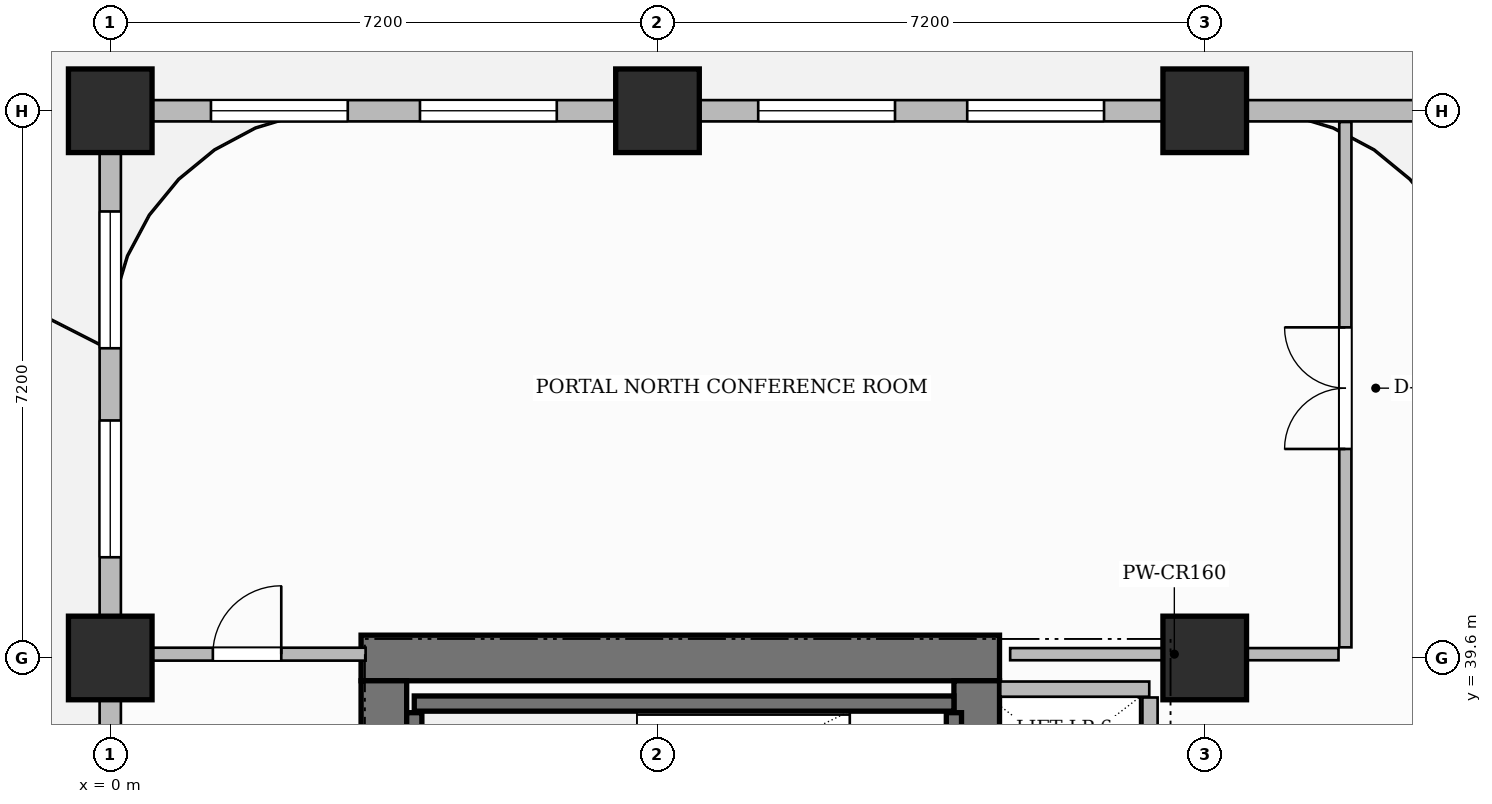
"""IFC4 building model, lengths in metres.
Left out: names, types, materials, properties, quantities, classifications, styles, units other than length and angle.
Written with IfcOpenShell. Run it as: python <this file> out.ifc"""

import sys

from ifc_helpers import new_model, si_unit, direction, frame, frame_2d, origin, origin_2d, place, context, subcontext, project, spatial, rectangle, extrude, source, transform, mapped, element, fill, save


model = new_model("IFC4")
c1 = context("Model", 3, precision=1e-05, world=origin(), true_north=direction((0.0, 1.0)))
c2 = subcontext(c1, "Body", "Model", "MODEL_VIEW")
j1 = project(units=[si_unit("LENGTHUNIT", "METRE"), si_unit("PLANEANGLEUNIT", "RADIAN")], contexts=[c1])
p1 = place(None, origin())
s1 = spatial("IfcSite", under=j1, at=p1, CompositionType="ELEMENT")
p2 = place(p1, origin())
s2 = spatial("IfcBuilding", under=s1, at=p2, CompositionType="ELEMENT")
p3 = place(p2, frame((0.0, 0.0, 58.3)))
s3 = spatial("IfcBuildingStorey", under=s2, at=p3, CompositionType="ELEMENT", Elevation=58.3)
p4 = place(p3, frame((3.3, 39.6, 0.0), z_axis=(0.0, 0.0, 1.0), x_axis=(1.0, 0.0, 0.0)))
e1 = element("IfcWall", 1, at=p4, inside=s3, PredefinedType="SHEAR", context=c2, shape_type="SweptSolid", body=[
    extrude(rectangle(XDim=8.4, YDim=0.6, at=frame_2d((4.2, 0.0))), origin(), (0.0, 0.0, 1.0), 3.7),
])
p5 = place(p3, frame((3.6, 25.5, 0.0), z_axis=(0.0, 0.0, 1.0), x_axis=(0.0, 1.0, 0.0)))
e2 = element("IfcWall", 2, at=p5, inside=s3, PredefinedType="SHEAR", context=c2, shape_type="SweptSolid", body=[
    extrude(rectangle(XDim=13.8, YDim=0.6, at=frame_2d((6.9, 0.0))), origin(), (0.0, 0.0, 1.0), 3.7),
])
p6 = place(p3, frame((11.4, 25.5, 0.0), z_axis=(0.0, 0.0, 1.0), x_axis=(0.0, 1.0, 0.0)))
e3 = element("IfcWall", 3, at=p6, inside=s3, PredefinedType="SHEAR", context=c2, shape_type="SweptSolid", body=[
    extrude(rectangle(XDim=13.8, YDim=0.6, at=frame_2d((6.9, 0.0))), origin(), (0.0, 0.0, 1.0), 3.7),
])
p7 = place(p6, frame((6.47, 0.0, 0.0)))
e4 = element("IfcOpeningElement", 4, at=p7, cuts=e3, PredefinedType="OPENING", context=c2, shape_type="SweptSolid", body=[
    extrude(rectangle(XDim=1.5, YDim=2.2, at=frame_2d((0.75, 1.1))), frame((0.0, 0.31, 0.0), z_axis=(0.0, -1.0, 0.0), x_axis=(1.0, 0.0, 0.0)), (0.0, 0.0, 1.0), 0.62),
])
m1 = source(origin(), c2, "Body", "SweptSolid", [
    extrude(rectangle(XDim=1.1, YDim=1.1, at=origin_2d()), origin(), (0.0, 0.0, 1.0), 3.7),
])
for number, where, z_axis, x_axis in (
    (5, (0.0, 39.6, 0.0), (0.0, 0.0, 1.0), (1.0, 0.0, 0.0)),
    (6, (0.0, 46.8, 0.0), (0.0, 0.0, 1.0), (1.0, 0.0, 0.0)),
    (7, (7.2, 46.8, 0.0), (0.0, 0.0, 1.0), (1.0, 0.0, 0.0)),
    (8, (14.4, 39.6, 0.0), (0.0, 0.0, 1.0), (1.0, 0.0, 0.0)),
    (9, (14.4, 46.8, 0.0), (0.0, 0.0, 1.0), (1.0, 0.0, 0.0)),
):
    element("IfcColumn", number, at=place(p3, frame(where, z_axis=z_axis, x_axis=x_axis)), inside=s3, PredefinedType="COLUMN", context=c2, shape_type="MappedRepresentation", body=[
        mapped(m1, transform((0.0, 0.0, 0.0), scale=1.0)),
    ])
p8 = place(p3, frame((4.0, 39.0, 0.0), z_axis=(0.0, 0.0, 1.0), x_axis=(1.0, 0.0, 0.0)))
e10 = element("IfcWall", 10, at=p8, inside=s3, PredefinedType="SHEAR", context=c2, shape_type="SweptSolid", body=[
    extrude(rectangle(XDim=7.1, YDim=0.2, at=frame_2d((3.55, 0.0))), origin(), (0.0, 0.0, 1.0), 3.7),
])
for number, where, z_axis, x_axis in (
    (11, (4.0, 36.18, 0.0), (0.0, 0.0, 1.0), (0.0, 1.0, 0.0)),
    (12, (11.1, 36.18, 0.0), (0.0, 0.0, 1.0), (0.0, 1.0, 0.0)),
):
    element("IfcWall", number, at=place(p3, frame(where, z_axis=z_axis, x_axis=x_axis)), inside=s3, PredefinedType="SHEAR", context=c2, shape_type="SweptSolid", body=[
        extrude(rectangle(XDim=2.7, YDim=0.2, at=frame_2d((1.35, 0.0))), origin(), (0.0, 0.0, 1.0), 3.7),
    ])
p9 = place(p3, frame((11.71, 39.19, 0.0), z_axis=(0.0, 0.0, 1.0), x_axis=(1.0, 0.0, 0.0)))
e13 = element("IfcWall", 13, at=p9, inside=s3, PredefinedType="PARTITIONING", context=c2, shape_type="SweptSolid", body=[
    extrude(rectangle(XDim=1.96, YDim=0.2, at=frame_2d((0.98, 0.0))), origin(), (0.0, 0.0, 1.0), 3.45),
])
p10 = place(p3, frame((13.68, 34.36, 0.0), z_axis=(0.0, 0.0, 1.0), x_axis=(0.0, 1.0, 0.0)))
e14 = element("IfcWall", 14, at=p10, inside=s3, PredefinedType="PARTITIONING", context=c2, shape_type="SweptSolid", body=[
    extrude(rectangle(XDim=4.72, YDim=0.2, at=frame_2d((2.36, 0.0))), origin(), (0.0, 0.0, 1.0), 3.45),
])
p11 = place(p3, frame((16.25, 39.74, 0.0), z_axis=(0.0, 0.0, 1.0), x_axis=(0.0, 1.0, 0.0)))
e15 = element("IfcWall", 15, at=p11, inside=s3, PredefinedType="PARTITIONING", context=c2, shape_type="SweptSolid", body=[
    extrude(rectangle(XDim=6.912, YDim=0.16, at=frame_2d((3.456, 0.0))), origin(), (0.0, 0.0, 1.0), 3.45),
])
p12 = place(p11, frame((2.61, 0.0, 0.0)))
e16 = element("IfcOpeningElement", 16, at=p12, cuts=e15, PredefinedType="OPENING", context=c2, shape_type="SweptSolid", body=[
    extrude(rectangle(XDim=1.6, YDim=2.4, at=frame_2d((0.8, 1.2))), frame((0.0, 0.09, 0.0), z_axis=(0.0, -1.0, 0.0), x_axis=(1.0, 0.0, 0.0)), (0.0, 0.0, 1.0), 0.18),
])
p13 = place(p3, frame((11.84, 39.65, 0.0), z_axis=(0.0, 0.0, 1.0), x_axis=(1.0, 0.0, 0.0)))
e17 = element("IfcWall", 17, at=p13, inside=s3, PredefinedType="PARTITIONING", context=c2, shape_type="SweptSolid", body=[
    extrude(rectangle(XDim=4.32, YDim=0.16, at=frame_2d((2.16, 0.0))), origin(), (0.0, 0.0, 1.0), 2.885),
])
p14 = place(p3, frame((0.24, 39.65, 0.0), z_axis=(0.0, 0.0, 1.0), x_axis=(1.0, 0.0, 0.0)))
e18 = element("IfcWall", 18, at=p14, inside=s3, PredefinedType="PARTITIONING", context=c2, shape_type="SweptSolid", body=[
    extrude(rectangle(XDim=3.12, YDim=0.17, at=frame_2d((1.56, 0.0))), origin(), (0.0, 0.0, 1.0), 3.45),
])
p15 = place(p14, frame((1.11, 0.0, 0.0)))
e19 = element("IfcOpeningElement", 19, at=p15, cuts=e18, PredefinedType="OPENING", context=c2, shape_type="SweptSolid", body=[
    extrude(rectangle(XDim=0.9, YDim=2.15, at=frame_2d((0.45, 1.075))), frame((0.0, 0.095, 0.0), z_axis=(0.0, -1.0, 0.0), x_axis=(1.0, 0.0, 0.0)), (0.0, 0.0, 1.0), 0.19),
])
p16 = place(p3, frame((0.0, 46.8, 0.0), z_axis=(0.0, 0.0, 1.0), x_axis=(1.0, 0.0, 0.0)))
e20 = element("IfcWall", 20, at=p16, inside=s3, PredefinedType="SOLIDWALL", context=c2, shape_type="SweptSolid", body=[
    extrude(rectangle(XDim=18.0, YDim=0.28, at=frame_2d((9.0, 0.0))), origin(), (0.0, 0.0, 1.0), 2.885),
])
p17 = place(p16, frame((1.325, 0.0, 0.8)))
e21 = element("IfcOpeningElement", 21, at=p17, cuts=e20, PredefinedType="OPENING", context=c2, shape_type="SweptSolid", body=[
    extrude(rectangle(XDim=1.8, YDim=1.85, at=frame_2d((0.9, 0.925))), frame((0.0, 0.15, 0.0), z_axis=(0.0, -1.0, 0.0), x_axis=(1.0, 0.0, 0.0)), (0.0, 0.0, 1.0), 0.3),
])
p18 = place(p16, frame((4.075, 0.0, 0.8)))
e22 = element("IfcOpeningElement", 22, at=p18, cuts=e20, PredefinedType="OPENING", context=c2, shape_type="SweptSolid", body=[
    extrude(rectangle(XDim=1.8, YDim=1.85, at=frame_2d((0.9, 0.925))), frame((0.0, 0.15, 0.0), z_axis=(0.0, -1.0, 0.0), x_axis=(1.0, 0.0, 0.0)), (0.0, 0.0, 1.0), 0.3),
])
p19 = place(p16, frame((8.525, 0.0, 0.8)))
e23 = element("IfcOpeningElement", 23, at=p19, cuts=e20, PredefinedType="OPENING", context=c2, shape_type="SweptSolid", body=[
    extrude(rectangle(XDim=1.8, YDim=1.85, at=frame_2d((0.9, 0.925))), frame((0.0, 0.15, 0.0), z_axis=(0.0, -1.0, 0.0), x_axis=(1.0, 0.0, 0.0)), (0.0, 0.0, 1.0), 0.3),
])
p20 = place(p16, frame((11.275, 0.0, 0.8)))
e24 = element("IfcOpeningElement", 24, at=p20, cuts=e20, PredefinedType="OPENING", context=c2, shape_type="SweptSolid", body=[
    extrude(rectangle(XDim=1.8, YDim=1.85, at=frame_2d((0.9, 0.925))), frame((0.0, 0.15, 0.0), z_axis=(0.0, -1.0, 0.0), x_axis=(1.0, 0.0, 0.0)), (0.0, 0.0, 1.0), 0.3),
])
p21 = place(p3, frame((0.0, 25.25, 0.0), z_axis=(0.0, 0.0, 1.0), x_axis=(0.0, 1.0, 0.0)))
e25 = element("IfcWall", 25, at=p21, inside=s3, PredefinedType="SOLIDWALL", context=c2, shape_type="SweptSolid", body=[
    extrude(rectangle(XDim=21.5, YDim=0.28, at=frame_2d((10.75, 0.0))), origin(), (0.0, 0.0, 1.0), 2.885),
])
p22 = place(p21, frame((1.275, 0.0, 0.8)))
e26 = element("IfcOpeningElement", 26, at=p22, cuts=e25, PredefinedType="OPENING", context=c2, shape_type="SweptSolid", body=[
    extrude(rectangle(XDim=1.8, YDim=1.85, at=frame_2d((0.9, 0.925))), frame((0.0, 0.15, 0.0), z_axis=(0.0, -1.0, 0.0), x_axis=(1.0, 0.0, 0.0)), (0.0, 0.0, 1.0), 0.3),
])
p23 = place(p21, frame((4.025, 0.0, 0.8)))
e27 = element("IfcOpeningElement", 27, at=p23, cuts=e25, PredefinedType="OPENING", context=c2, shape_type="SweptSolid", body=[
    extrude(rectangle(XDim=1.8, YDim=1.85, at=frame_2d((0.9, 0.925))), frame((0.0, 0.15, 0.0), z_axis=(0.0, -1.0, 0.0), x_axis=(1.0, 0.0, 0.0)), (0.0, 0.0, 1.0), 0.3),
])
p24 = place(p21, frame((8.475, 0.0, 0.8)))
e28 = element("IfcOpeningElement", 28, at=p24, cuts=e25, PredefinedType="OPENING", context=c2, shape_type="SweptSolid", body=[
    extrude(rectangle(XDim=1.8, YDim=1.85, at=frame_2d((0.9, 0.925))), frame((0.0, 0.15, 0.0), z_axis=(0.0, -1.0, 0.0), x_axis=(1.0, 0.0, 0.0)), (0.0, 0.0, 1.0), 0.3),
])
p25 = place(p21, frame((11.225, 0.0, 0.8)))
e29 = element("IfcOpeningElement", 29, at=p25, cuts=e25, PredefinedType="OPENING", context=c2, shape_type="SweptSolid", body=[
    extrude(rectangle(XDim=1.8, YDim=1.85, at=frame_2d((0.9, 0.925))), frame((0.0, 0.15, 0.0), z_axis=(0.0, -1.0, 0.0), x_axis=(1.0, 0.0, 0.0)), (0.0, 0.0, 1.0), 0.3),
])
p26 = place(p21, frame((15.675, 0.0, 0.8)))
e30 = element("IfcOpeningElement", 30, at=p26, cuts=e25, PredefinedType="OPENING", context=c2, shape_type="SweptSolid", body=[
    extrude(rectangle(XDim=1.8, YDim=1.85, at=frame_2d((0.9, 0.925))), frame((0.0, 0.15, 0.0), z_axis=(0.0, -1.0, 0.0), x_axis=(1.0, 0.0, 0.0)), (0.0, 0.0, 1.0), 0.3),
])
p27 = place(p21, frame((18.425, 0.0, 0.8)))
e31 = element("IfcOpeningElement", 31, at=p27, cuts=e25, PredefinedType="OPENING", context=c2, shape_type="SweptSolid", body=[
    extrude(rectangle(XDim=1.8, YDim=1.85, at=frame_2d((0.9, 0.925))), frame((0.0, 0.15, 0.0), z_axis=(0.0, -1.0, 0.0), x_axis=(1.0, 0.0, 0.0)), (0.0, 0.0, 1.0), 0.3),
])
m2 = source(origin(), c2, "Body", "SweptSolid", [
    extrude(rectangle(XDim=0.9, YDim=2.15, at=frame_2d((0.45, 1.075))), frame((0.0, 0.025, 0.0), z_axis=(0.0, -1.0, 0.0), x_axis=(1.0, 0.0, 0.0)), (0.0, 0.0, 1.0), 0.05),
])
p28 = place(p15, origin())
e32 = element("IfcDoor", 32, at=p28, inside=s3, OperationType="SINGLE_SWING_RIGHT", PredefinedType="DOOR", context=c2, shape_type="MappedRepresentation", body=[
    mapped(m2, transform((0.0, 0.0, 0.0), scale=1.0)),
])
fill(e19, e32)
m3 = source(origin(), c2, "Body", "SweptSolid", [
    extrude(rectangle(XDim=1.6, YDim=2.4, at=frame_2d((0.8, 1.2))), frame((0.0, 0.025, 0.0), z_axis=(0.0, -1.0, 0.0), x_axis=(1.0, 0.0, 0.0)), (0.0, 0.0, 1.0), 0.05),
])
p29 = place(p12, origin())
e33 = element("IfcDoor", 33, at=p29, inside=s3, OperationType="DOUBLE_DOOR_SINGLE_SWING", PredefinedType="DOOR", context=c2, shape_type="MappedRepresentation", body=[
    mapped(m3, transform((0.0, 0.0, 0.0), scale=1.0)),
])
fill(e16, e33)
m4 = source(origin(), c2, "Body", "SweptSolid", [
    extrude(rectangle(XDim=1.8, YDim=1.85, at=frame_2d((0.9, 0.925))), frame((0.0, 0.03, 0.0), z_axis=(0.0, -1.0, 0.0), x_axis=(1.0, 0.0, 0.0)), (0.0, 0.0, 1.0), 0.06),
])
p30 = place(p17, origin())
e34 = element("IfcWindow", 34, at=p30, inside=s3, PartitioningType="DOUBLE_PANEL_VERTICAL", PredefinedType="WINDOW", context=c2, shape_type="MappedRepresentation", body=[
    mapped(m4, transform((0.0, 0.0, 0.0), scale=1.0)),
])
fill(e21, e34)
p31 = place(p18, origin())
e35 = element("IfcWindow", 35, at=p31, inside=s3, PartitioningType="DOUBLE_PANEL_VERTICAL", PredefinedType="WINDOW", context=c2, shape_type="MappedRepresentation", body=[
    mapped(m4, transform((0.0, 0.0, 0.0), scale=1.0)),
])
fill(e22, e35)
p32 = place(p19, origin())
e36 = element("IfcWindow", 36, at=p32, inside=s3, PartitioningType="DOUBLE_PANEL_VERTICAL", PredefinedType="WINDOW", context=c2, shape_type="MappedRepresentation", body=[
    mapped(m4, transform((0.0, 0.0, 0.0), scale=1.0)),
])
fill(e23, e36)
p33 = place(p20, origin())
e37 = element("IfcWindow", 37, at=p33, inside=s3, PartitioningType="DOUBLE_PANEL_VERTICAL", PredefinedType="WINDOW", context=c2, shape_type="MappedRepresentation", body=[
    mapped(m4, transform((0.0, 0.0, 0.0), scale=1.0)),
])
fill(e24, e37)
p34 = place(p26, origin())
e38 = element("IfcWindow", 38, at=p34, inside=s3, PartitioningType="DOUBLE_PANEL_VERTICAL", PredefinedType="WINDOW", context=c2, shape_type="MappedRepresentation", body=[
    mapped(m4, transform((0.0, 0.0, 0.0), scale=1.0)),
])
fill(e30, e38)
p35 = place(p27, origin())
e39 = element("IfcWindow", 39, at=p35, inside=s3, PartitioningType="DOUBLE_PANEL_VERTICAL", PredefinedType="WINDOW", context=c2, shape_type="MappedRepresentation", body=[
    mapped(m4, transform((0.0, 0.0, 0.0), scale=1.0)),
])
fill(e31, e39)
save(model, sys.argv[1])
